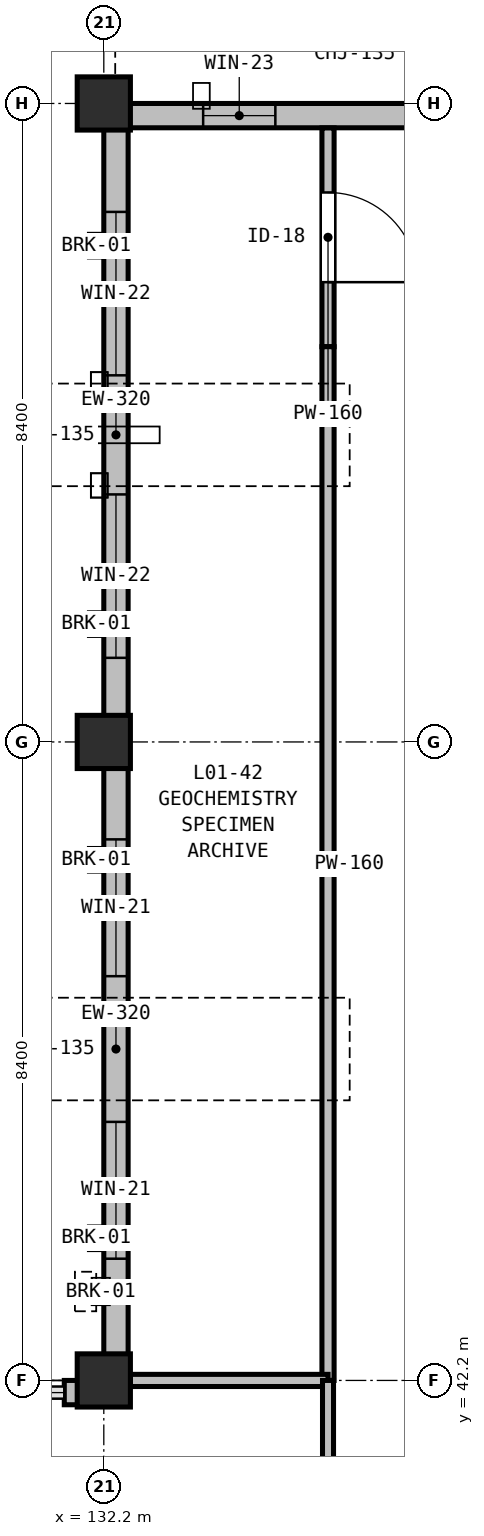
"""IFC4 building model, lengths in metres.
Left out: names, types, materials, properties, quantities, classifications, styles, units other than length and angle.
Written with IfcOpenShell. Run it as: python <this file> out.ifc"""

import sys

from ifc_helpers import new_model, si_unit, direction, frame, frame_2d, origin, origin_2d, place, context, subcontext, project, spatial, rectangle, extrude, element, fill, save


model = new_model("IFC4")
c1 = context("Model", 3, precision=1e-05, world=origin(), true_north=direction((0.0, 1.0)))
c2 = subcontext(c1, "Body", "Model", "MODEL_VIEW")
j1 = project(units=[si_unit("LENGTHUNIT", "METRE"), si_unit("PLANEANGLEUNIT", "RADIAN")], contexts=[c1])
p1 = place(None, origin())
s1 = spatial("IfcSite", under=j1, at=p1, CompositionType="ELEMENT")
p2 = place(p1, origin())
s2 = spatial("IfcBuilding", under=s1, at=p2, CompositionType="ELEMENT")
p3 = place(p2, frame((0.0, 0.0, 5.4)))
s3 = spatial("IfcBuildingStorey", under=s2, at=p3, CompositionType="ELEMENT", Elevation=5.4)
for number, where, z_axis, x_axis in (
    (1, (132.2, 42.2, 0.0), (0.0, 0.0, 1.0), (1.0, 0.0, 0.0)),
    (2, (132.2, 50.6, 0.0), (0.0, 0.0, 1.0), (1.0, 0.0, 0.0)),
    (3, (132.2, 59.0, 0.0), (0.0, 0.0, 1.0), (1.0, 0.0, 0.0)),
):
    element("IfcColumn", number, at=place(p3, frame(where, z_axis=z_axis, x_axis=x_axis)), inside=s3, PredefinedType="COLUMN", context=c2, shape_type="SweptSolid", body=[
        extrude(rectangle(XDim=0.7, YDim=0.7, at=origin_2d()), origin(), (0.0, 0.0, 1.0), 4.8),
    ])
p4 = place(p3, frame((132.36, 42.52, 0.0), z_axis=(0.0, 0.0, 1.0), x_axis=(0.0, 1.0, 0.0)))
e4 = element("IfcWall", 4, at=p4, inside=s3, PredefinedType="STANDARD", context=c2, shape_type="SweptSolid", body=[
    extrude(rectangle(XDim=8.08, YDim=0.32, at=frame_2d((4.04, 0.0))), origin(), (0.0, 0.0, 1.0), 4.085),
])
p5 = place(p4, frame((1.281, 0.0, 0.75)))
e5 = element("IfcOpeningElement", 5, at=p5, cuts=e4, PredefinedType="OPENING", context=c2, shape_type="SweptSolid", body=[
    extrude(rectangle(XDim=1.8, YDim=2.4, at=frame_2d((0.9, 1.2))), frame((0.0, 0.17, 0.0), z_axis=(0.0, -1.0, 0.0), x_axis=(1.0, 0.0, 0.0)), (0.0, 0.0, 1.0), 0.34),
])
p6 = place(p4, frame((4.998, 0.0, 0.75)))
e6 = element("IfcOpeningElement", 6, at=p6, cuts=e4, PredefinedType="OPENING", context=c2, shape_type="SweptSolid", body=[
    extrude(rectangle(XDim=1.8, YDim=2.4, at=frame_2d((0.9, 1.2))), frame((0.0, 0.17, 0.0), z_axis=(0.0, -1.0, 0.0), x_axis=(1.0, 0.0, 0.0)), (0.0, 0.0, 1.0), 0.34),
])
p7 = place(p3, frame((132.36, 50.6, 0.0), z_axis=(0.0, 0.0, 1.0), x_axis=(0.0, 1.0, 0.0)))
e7 = element("IfcWall", 7, at=p7, inside=s3, PredefinedType="STANDARD", context=c2, shape_type="SweptSolid", body=[
    extrude(rectangle(XDim=8.08, YDim=0.32, at=frame_2d((4.04, 0.0))), origin(), (0.0, 0.0, 1.0), 4.085),
])
p8 = place(p7, frame((1.107, 0.0, 0.75)))
e8 = element("IfcOpeningElement", 8, at=p8, cuts=e7, PredefinedType="OPENING", context=c2, shape_type="SweptSolid", body=[
    extrude(rectangle(XDim=2.15, YDim=2.4, at=frame_2d((1.075, 1.2))), frame((0.0, 0.17, 0.0), z_axis=(0.0, -1.0, 0.0), x_axis=(1.0, 0.0, 0.0)), (0.0, 0.0, 1.0), 0.34),
])
p9 = place(p7, frame((4.823, 0.0, 0.75)))
e9 = element("IfcOpeningElement", 9, at=p9, cuts=e7, PredefinedType="OPENING", context=c2, shape_type="SweptSolid", body=[
    extrude(rectangle(XDim=2.15, YDim=2.4, at=frame_2d((1.075, 1.2))), frame((0.0, 0.17, 0.0), z_axis=(0.0, -1.0, 0.0), x_axis=(1.0, 0.0, 0.0)), (0.0, 0.0, 1.0), 0.34),
])
p10 = place(p3, frame((132.2, 58.84, 0.0), z_axis=(0.0, 0.0, 1.0), x_axis=(1.0, 0.0, 0.0)))
e10 = element("IfcWall", 10, at=p10, inside=s3, PredefinedType="STANDARD", context=c2, shape_type="SweptSolid", body=[
    extrude(rectangle(XDim=6.6, YDim=0.32, at=frame_2d((3.3, 0.0))), origin(), (0.0, 0.0, 1.0), 3.935),
])
p11 = place(p10, frame((1.307, 0.0, 0.9)))
e11 = element("IfcOpeningElement", 11, at=p11, cuts=e10, PredefinedType="OPENING", context=c2, shape_type="SweptSolid", body=[
    extrude(rectangle(XDim=0.95, YDim=1.8, at=frame_2d((0.475, 0.9))), frame((0.0, 0.17, 0.0), z_axis=(0.0, -1.0, 0.0), x_axis=(1.0, 0.0, 0.0)), (0.0, 0.0, 1.0), 0.34),
])
p12 = place(p10, frame((4.343, 0.0, 0.9)))
e12 = element("IfcOpeningElement", 12, at=p12, cuts=e10, PredefinedType="OPENING", context=c2, shape_type="SweptSolid", body=[
    extrude(rectangle(XDim=0.95, YDim=1.8, at=frame_2d((0.475, 0.9))), frame((0.0, 0.17, 0.0), z_axis=(0.0, -1.0, 0.0), x_axis=(1.0, 0.0, 0.0)), (0.0, 0.0, 1.0), 0.34),
])
p13 = place(p3, frame((131.68, 42.04, 0.0), z_axis=(0.0, 0.0, 1.0), x_axis=(1.0, 0.0, 0.0)))
e13 = element("IfcWall", 13, at=p13, inside=s3, PredefinedType="STANDARD", context=c2, shape_type="SweptSolid", body=[
    extrude(rectangle(XDim=0.52, YDim=0.32, at=frame_2d((0.26, 0.0))), origin(), (0.0, 0.0, 1.0), 3.935),
])
p14 = place(p3, frame((135.15, 58.678, 0.0), z_axis=(0.0, 0.0, 1.0), x_axis=(0.0, -1.0, 0.0)))
e14 = element("IfcWall", 14, at=p14, inside=s3, PredefinedType="PARTITIONING", context=c2, shape_type="SweptSolid", body=[
    extrude(rectangle(XDim=2.878, YDim=0.16, at=frame_2d((1.439, 0.0))), origin(), (0.0, 0.0, 1.0), 4.085),
])
p15 = place(p14, frame((0.849, 0.0, 0.0)))
e15 = element("IfcOpeningElement", 15, at=p15, cuts=e14, PredefinedType="OPENING", context=c2, shape_type="SweptSolid", body=[
    extrude(rectangle(XDim=1.18, YDim=2.1, at=frame_2d((0.59, 1.05))), frame((0.0, 0.09, 0.0), z_axis=(0.0, -1.0, 0.0), x_axis=(1.0, 0.0, 0.0)), (0.0, 0.0, 1.0), 0.18),
])
p16 = place(p3, frame((135.15, 55.8, 0.0), z_axis=(0.0, 0.0, 1.0), x_axis=(0.0, -1.0, 0.0)))
e16 = element("IfcWall", 16, at=p16, inside=s3, PredefinedType="PARTITIONING", context=c2, shape_type="SweptSolid", body=[
    extrude(rectangle(XDim=13.6, YDim=0.16, at=frame_2d((6.8, 0.0))), origin(), (0.0, 0.0, 1.0), 4.135),
])
p17 = place(p3, frame((135.15, 42.2, 0.0), z_axis=(0.0, 0.0, 1.0), x_axis=(-1.0, 0.0, 0.0)))
e17 = element("IfcWall", 17, at=p17, inside=s3, PredefinedType="PARTITIONING", context=c2, shape_type="SweptSolid", body=[
    extrude(rectangle(XDim=2.6, YDim=0.16, at=frame_2d((1.3, 0.0))), origin(), (0.0, 0.0, 1.0), 4.135),
])
p18 = place(p3, frame((135.15, 42.2, 0.0), z_axis=(0.0, 0.0, 1.0), x_axis=(0.0, -1.0, 0.0)))
e18 = element("IfcWall", 18, at=p18, inside=s3, PredefinedType="PARTITIONING", context=c2, shape_type="SweptSolid", body=[
    extrude(rectangle(XDim=9.498, YDim=0.145, at=frame_2d((4.749, 0.0))), origin(), (0.0, 0.0, 1.0), 4.135),
])
p19 = place(p18, frame((3.899, 0.0, 0.0)))
e19 = element("IfcOpeningElement", 19, at=p19, cuts=e18, PredefinedType="OPENING", context=c2, shape_type="SweptSolid", body=[
    extrude(rectangle(XDim=1.7, YDim=2.14, at=frame_2d((0.85, 1.07))), frame((0.0, 0.083, 0.0), z_axis=(0.0, -1.0, 0.0), x_axis=(1.0, 0.0, 0.0)), (0.0, 0.0, 1.0), 0.165),
])
p20 = place(p5, origin())
e20 = element("IfcWindow", 20, at=p20, inside=s3, PartitioningType="SINGLE_PANEL", PredefinedType="WINDOW", context=c2, shape_type="SweptSolid", body=[
    extrude(rectangle(XDim=1.8, YDim=2.4, at=frame_2d((0.9, 1.2))), frame((0.0, 0.03, 0.0), z_axis=(0.0, -1.0, 0.0), x_axis=(1.0, 0.0, 0.0)), (0.0, 0.0, 1.0), 0.06),
])
fill(e5, e20)
p21 = place(p6, origin())
e21 = element("IfcWindow", 21, at=p21, inside=s3, PartitioningType="SINGLE_PANEL", PredefinedType="WINDOW", context=c2, shape_type="SweptSolid", body=[
    extrude(rectangle(XDim=1.8, YDim=2.4, at=frame_2d((0.9, 1.2))), frame((0.0, 0.03, 0.0), z_axis=(0.0, -1.0, 0.0), x_axis=(1.0, 0.0, 0.0)), (0.0, 0.0, 1.0), 0.06),
])
fill(e6, e21)
p22 = place(p8, origin())
e22 = element("IfcWindow", 22, at=p22, inside=s3, PartitioningType="SINGLE_PANEL", PredefinedType="WINDOW", context=c2, shape_type="SweptSolid", body=[
    extrude(rectangle(XDim=2.15, YDim=2.4, at=frame_2d((1.075, 1.2))), frame((0.0, 0.03, 0.0), z_axis=(0.0, -1.0, 0.0), x_axis=(1.0, 0.0, 0.0)), (0.0, 0.0, 1.0), 0.06),
])
fill(e8, e22)
p23 = place(p9, origin())
e23 = element("IfcWindow", 23, at=p23, inside=s3, PartitioningType="SINGLE_PANEL", PredefinedType="WINDOW", context=c2, shape_type="SweptSolid", body=[
    extrude(rectangle(XDim=2.15, YDim=2.4, at=frame_2d((1.075, 1.2))), frame((0.0, 0.03, 0.0), z_axis=(0.0, -1.0, 0.0), x_axis=(1.0, 0.0, 0.0)), (0.0, 0.0, 1.0), 0.06),
])
fill(e9, e23)
p24 = place(p11, origin())
e24 = element("IfcWindow", 24, at=p24, inside=s3, PartitioningType="SINGLE_PANEL", PredefinedType="WINDOW", context=c2, shape_type="SweptSolid", body=[
    extrude(rectangle(XDim=0.95, YDim=1.8, at=frame_2d((0.475, 0.9))), frame((0.0, 0.03, 0.0), z_axis=(0.0, -1.0, 0.0), x_axis=(1.0, 0.0, 0.0)), (0.0, 0.0, 1.0), 0.06),
])
fill(e11, e24)
p25 = place(p15, origin())
e25 = element("IfcDoor", 25, at=p25, inside=s3, OperationType="SINGLE_SWING_RIGHT", PredefinedType="DOOR", context=c2, shape_type="SweptSolid", body=[
    extrude(rectangle(XDim=1.18, YDim=2.1, at=frame_2d((0.59, 1.05))), frame((0.0, 0.025, 0.0), z_axis=(0.0, -1.0, 0.0), x_axis=(1.0, 0.0, 0.0)), (0.0, 0.0, 1.0), 0.05),
])
fill(e15, e25)
save(model, sys.argv[1])
